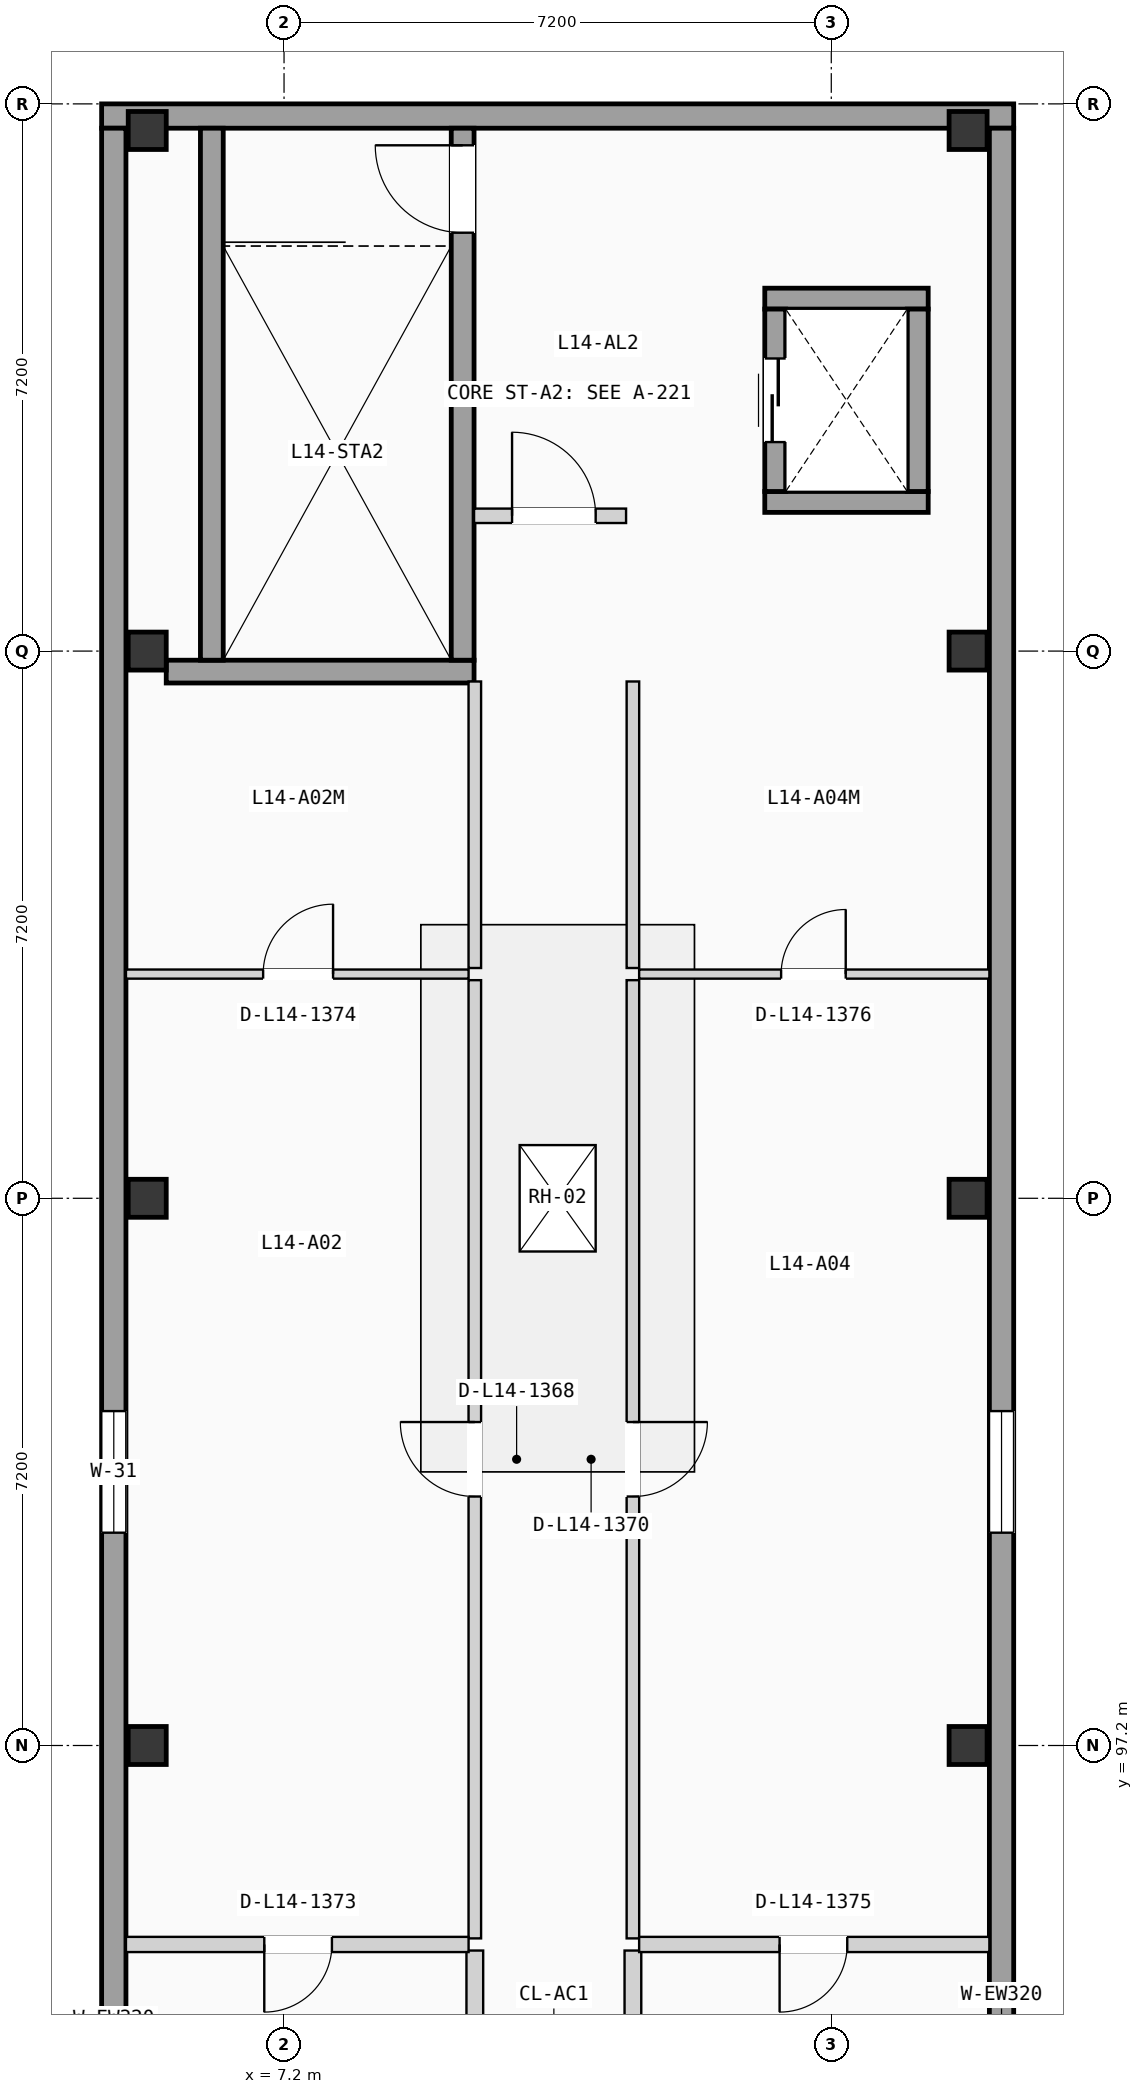
"""IFC4 building model, lengths in metres.
Left out: names, types, materials, properties, quantities, classifications, styles, units other than length and angle.
Written with IfcOpenShell. Run it as: python <this file> out.ifc"""

import sys

from ifc_helpers import new_model, si_unit, direction, frame, frame_2d, origin, origin_2d, place, context, subcontext, project, spatial, rectangle, extrude, element, fill, save


model = new_model("IFC4")
c1 = context("Model", 3, precision=1e-05, world=origin(), true_north=direction((0.0, 1.0)))
c2 = subcontext(c1, "Body", "Model", "MODEL_VIEW")
j1 = project(units=[si_unit("LENGTHUNIT", "METRE"), si_unit("PLANEANGLEUNIT", "RADIAN")], contexts=[c1])
p1 = place(None, origin())
s1 = spatial("IfcSite", under=j1, at=p1, CompositionType="ELEMENT")
p2 = place(p1, origin())
s2 = spatial("IfcBuilding", under=s1, at=p2, CompositionType="ELEMENT")
p3 = place(p2, frame((0.0, 0.0, 46.725)))
s3 = spatial("IfcBuildingStorey", under=s2, at=p3, CompositionType="ELEMENT", Elevation=46.725)
for number, where, z_axis, x_axis in (
    (1, (5.4, 97.2, 0.0), (0.0, 0.0, 1.0), (1.0, 0.0, 0.0)),
    (2, (5.4, 104.4, 0.0), (0.0, 0.0, 1.0), (1.0, 0.0, 0.0)),
    (3, (5.4, 111.6, 0.0), (0.0, 0.0, 1.0), (1.0, 0.0, 0.0)),
    (4, (5.4, 118.45, 0.0), (0.0, 0.0, 1.0), (1.0, 0.0, 0.0)),
    (5, (16.2, 97.2, 0.0), (0.0, 0.0, 1.0), (1.0, 0.0, 0.0)),
    (6, (16.2, 104.4, 0.0), (0.0, 0.0, 1.0), (1.0, 0.0, 0.0)),
    (7, (16.2, 111.6, 0.0), (0.0, 0.0, 1.0), (1.0, 0.0, 0.0)),
    (8, (16.2, 118.45, 0.0), (0.0, 0.0, 1.0), (1.0, 0.0, 0.0)),
):
    element("IfcColumn", number, at=place(p3, frame(where, z_axis=z_axis, x_axis=x_axis)), inside=s3, PredefinedType="COLUMN", context=c2, shape_type="SweptSolid", body=[
        extrude(rectangle(XDim=0.5, YDim=0.5, at=origin_2d()), origin(), (0.0, 0.0, 1.0), 2.85),
    ])
p4 = place(p3, frame((4.8, 118.64, 0.0), z_axis=(0.0, 0.0, 1.0), x_axis=(1.0, 0.0, 0.0)))
e9 = element("IfcWall", 9, at=p4, inside=s3, PredefinedType="SOLIDWALL", context=c2, shape_type="SweptSolid", body=[
    extrude(rectangle(XDim=12.0, YDim=0.32, at=frame_2d((6.0, 0.0))), origin(), (0.0, 0.0, 1.0), 2.55),
])
p5 = place(p3, frame((4.96, 68.72, 0.0), z_axis=(0.0, 0.0, 1.0), x_axis=(0.0, 1.0, 0.0)))
e10 = element("IfcWall", 10, at=p5, inside=s3, PredefinedType="SOLIDWALL", context=c2, shape_type="SweptSolid", body=[
    extrude(rectangle(XDim=49.76, YDim=0.32, at=frame_2d((24.88, 0.0))), origin(), (0.0, 0.0, 1.0), 2.55),
])
p6 = place(p5, frame((16.161, 0.0, 0.515)))
e11 = element("IfcOpeningElement", 11, at=p6, cuts=e10, PredefinedType="OPENING", context=c2, shape_type="SweptSolid", body=[
    extrude(rectangle(XDim=1.48, YDim=1.65, at=frame_2d((0.74, 0.825))), frame((0.0, 0.17, 0.0), z_axis=(0.0, -1.0, 0.0), x_axis=(1.0, 0.0, 0.0)), (0.0, 0.0, 1.0), 0.34),
])
p7 = place(p5, frame((21.991, 0.0, 0.85)))
e12 = element("IfcOpeningElement", 12, at=p7, cuts=e10, PredefinedType="OPENING", context=c2, shape_type="SweptSolid", body=[
    extrude(rectangle(XDim=0.95, YDim=1.2, at=frame_2d((0.475, 0.6))), frame((0.0, 0.17, 0.0), z_axis=(0.0, -1.0, 0.0), x_axis=(1.0, 0.0, 0.0)), (0.0, 0.0, 1.0), 0.34),
])
p8 = place(p5, frame((31.28, 0.0, 0.75)))
e13 = element("IfcOpeningElement", 13, at=p8, cuts=e10, PredefinedType="OPENING", context=c2, shape_type="SweptSolid", body=[
    extrude(rectangle(XDim=1.6, YDim=1.2, at=frame_2d((0.8, 0.6))), frame((0.0, 0.17, 0.0), z_axis=(0.0, -1.0, 0.0), x_axis=(1.0, 0.0, 0.0)), (0.0, 0.0, 1.0), 0.34),
])
p9 = place(p3, frame((16.64, 68.72, 0.0), z_axis=(0.0, 0.0, 1.0), x_axis=(0.0, 1.0, 0.0)))
e14 = element("IfcWall", 14, at=p9, inside=s3, PredefinedType="SOLIDWALL", context=c2, shape_type="SweptSolid", body=[
    extrude(rectangle(XDim=49.76, YDim=0.32, at=frame_2d((24.88, 0.0))), origin(), (0.0, 0.0, 1.0), 2.55),
])
p10 = place(p9, frame((16.88, 0.0, 0.75)))
e15 = element("IfcOpeningElement", 15, at=p10, cuts=e14, PredefinedType="OPENING", context=c2, shape_type="SweptSolid", body=[
    extrude(rectangle(XDim=1.6, YDim=1.35, at=frame_2d((0.8, 0.675))), frame((0.0, 0.17, 0.0), z_axis=(0.0, -1.0, 0.0), x_axis=(1.0, 0.0, 0.0)), (0.0, 0.0, 1.0), 0.34),
])
p11 = place(p9, frame((31.28, 0.0, 0.665)))
e16 = element("IfcOpeningElement", 16, at=p11, cuts=e14, PredefinedType="OPENING", context=c2, shape_type="SweptSolid", body=[
    extrude(rectangle(XDim=1.6, YDim=1.5, at=frame_2d((0.8, 0.75))), frame((0.0, 0.17, 0.0), z_axis=(0.0, -1.0, 0.0), x_axis=(1.0, 0.0, 0.0)), (0.0, 0.0, 1.0), 0.34),
])
p12 = place(p3, frame((5.65, 111.33, 0.0), z_axis=(0.0, 0.0, 1.0), x_axis=(1.0, 0.0, 0.0)))
e17 = element("IfcWall", 17, at=p12, inside=s3, PredefinedType="SHEAR", context=c2, shape_type="SweptSolid", body=[
    extrude(rectangle(XDim=4.05, YDim=0.3, at=frame_2d((2.025, 0.0))), origin(), (0.0, 0.0, 1.0), 2.55),
])
p13 = place(p3, frame((6.25, 111.48, 0.0), z_axis=(0.0, 0.0, 1.0), x_axis=(0.0, 1.0, 0.0)))
e18 = element("IfcWall", 18, at=p13, inside=s3, PredefinedType="SHEAR", context=c2, shape_type="SweptSolid", body=[
    extrude(rectangle(XDim=7.0, YDim=0.3, at=frame_2d((3.5, 0.0))), origin(), (0.0, 0.0, 1.0), 2.55),
])
p14 = place(p3, frame((9.55, 111.48, 0.0), z_axis=(0.0, 0.0, 1.0), x_axis=(0.0, 1.0, 0.0)))
e19 = element("IfcWall", 19, at=p14, inside=s3, PredefinedType="SHEAR", context=c2, shape_type="SweptSolid", body=[
    extrude(rectangle(XDim=7.0, YDim=0.3, at=frame_2d((3.5, 0.0))), origin(), (0.0, 0.0, 1.0), 2.55),
])
p15 = place(p14, frame((5.625, 0.0, 0.0)))
e20 = element("IfcOpeningElement", 20, at=p15, cuts=e19, PredefinedType="OPENING", context=c2, shape_type="SweptSolid", body=[
    extrude(rectangle(XDim=1.15, YDim=2.12, at=frame_2d((0.575, 1.06))), frame((0.0, 0.16, 0.0), z_axis=(0.0, -1.0, 0.0), x_axis=(1.0, 0.0, 0.0)), (0.0, 0.0, 1.0), 0.32),
])
for number, where, z_axis, x_axis in (
    (21, (13.525, 113.562, 0.0), (0.0, 0.0, 1.0), (1.0, 0.0, 0.0)),
    (22, (13.525, 116.238, 0.0), (0.0, 0.0, 1.0), (1.0, 0.0, 0.0)),
):
    element("IfcWall", number, at=place(p3, frame(where, z_axis=z_axis, x_axis=x_axis)), inside=s3, PredefinedType="SHEAR", context=c2, shape_type="SweptSolid", body=[
        extrude(rectangle(XDim=2.15, YDim=0.275, at=frame_2d((1.075, 0.0))), origin(), (0.0, 0.0, 1.0), 2.55),
    ])
p16 = place(p3, frame((13.663, 113.7, 0.0), z_axis=(0.0, 0.0, 1.0), x_axis=(0.0, 1.0, 0.0)))
e23 = element("IfcWall", 23, at=p16, inside=s3, PredefinedType="SHEAR", context=c2, shape_type="SweptSolid", body=[
    extrude(rectangle(XDim=2.4, YDim=0.275, at=frame_2d((1.2, 0.0))), origin(), (0.0, 0.0, 1.0), 2.55),
])
p17 = place(p16, frame((0.65, 0.0, 0.0)))
e24 = element("IfcOpeningElement", 24, at=p17, cuts=e23, PredefinedType="OPENING", context=c2, shape_type="SweptSolid", body=[
    extrude(rectangle(XDim=1.1, YDim=2.15, at=frame_2d((0.55, 1.075))), frame((0.0, 0.147, 0.0), z_axis=(0.0, -1.0, 0.0), x_axis=(1.0, 0.0, 0.0)), (0.0, 0.0, 1.0), 0.295),
])
p18 = place(p3, frame((15.538, 113.7, 0.0), z_axis=(0.0, 0.0, 1.0), x_axis=(0.0, 1.0, 0.0)))
e25 = element("IfcWall", 25, at=p18, inside=s3, PredefinedType="SHEAR", context=c2, shape_type="SweptSolid", body=[
    extrude(rectangle(XDim=2.4, YDim=0.275, at=frame_2d((1.2, 0.0))), origin(), (0.0, 0.0, 1.0), 2.55),
])
p19 = place(p3, frame((9.7, 113.38, 0.0), z_axis=(0.0, 0.0, 1.0), x_axis=(1.0, 0.0, 0.0)))
e26 = element("IfcWall", 26, at=p19, inside=s3, PredefinedType="PARTITIONING", context=c2, shape_type="SweptSolid", body=[
    extrude(rectangle(XDim=2.0, YDim=0.19, at=frame_2d((1.0, 0.0))), origin(), (0.0, 0.0, 1.0), 2.39),
])
p20 = place(p19, frame((0.5, 0.0, 0.0)))
e27 = element("IfcOpeningElement", 27, at=p20, cuts=e26, PredefinedType="OPENING", context=c2, shape_type="SweptSolid", body=[
    extrude(rectangle(XDim=1.1, YDim=2.12, at=frame_2d((0.55, 1.06))), frame((0.0, 0.105, 0.0), z_axis=(0.0, -1.0, 0.0), x_axis=(1.0, 0.0, 0.0)), (0.0, 0.0, 1.0), 0.21),
])
p21 = place(p3, frame((9.71, 92.282, 0.0), z_axis=(0.0, 0.0, 1.0), x_axis=(0.0, 1.0, 0.0)))
e28 = element("IfcWall", 28, at=p21, inside=s3, PredefinedType="PLUMBINGWALL", context=c2, shape_type="SweptSolid", body=[
    extrude(rectangle(XDim=2.22, YDim=0.22, at=frame_2d((1.11, 0.0))), origin(), (0.0, 0.0, 1.0), 2.39),
])
p22 = place(p3, frame((9.71, 94.662, 0.0), z_axis=(0.0, 0.0, 1.0), x_axis=(0.0, 1.0, 0.0)))
e29 = element("IfcWall", 29, at=p22, inside=s3, PredefinedType="PARTITIONING", context=c2, shape_type="SweptSolid", body=[
    extrude(rectangle(XDim=12.608, YDim=0.165, at=frame_2d((6.304, 0.0))), origin(), (0.0, 0.0, 1.0), 2.39),
])
p23 = place(p22, frame((5.814, 0.0, 0.0)))
e30 = element("IfcOpeningElement", 30, at=p23, cuts=e29, PredefinedType="OPENING", context=c2, shape_type="SweptSolid", body=[
    extrude(rectangle(XDim=0.98, YDim=2.08, at=frame_2d((0.49, 1.04))), frame((0.0, 0.093, 0.0), z_axis=(0.0, -1.0, 0.0), x_axis=(1.0, 0.0, 0.0)), (0.0, 0.0, 1.0), 0.185),
])
p24 = place(p3, frame((9.71, 107.43, 0.0), z_axis=(0.0, 0.0, 1.0), x_axis=(0.0, 1.0, 0.0)))
e31 = element("IfcWall", 31, at=p24, inside=s3, PredefinedType="PARTITIONING", context=c2, shape_type="SweptSolid", body=[
    extrude(rectangle(XDim=3.77, YDim=0.165, at=frame_2d((1.885, 0.0))), origin(), (0.0, 0.0, 1.0), 2.39),
])
p25 = place(p3, frame((11.79, 92.282, 0.0), z_axis=(0.0, 0.0, 1.0), x_axis=(0.0, 1.0, 0.0)))
e32 = element("IfcWall", 32, at=p25, inside=s3, PredefinedType="PLUMBINGWALL", context=c2, shape_type="SweptSolid", body=[
    extrude(rectangle(XDim=2.22, YDim=0.22, at=frame_2d((1.11, 0.0))), origin(), (0.0, 0.0, 1.0), 2.39),
])
p26 = place(p3, frame((11.79, 94.662, 0.0), z_axis=(0.0, 0.0, 1.0), x_axis=(0.0, 1.0, 0.0)))
e33 = element("IfcWall", 33, at=p26, inside=s3, PredefinedType="PARTITIONING", context=c2, shape_type="SweptSolid", body=[
    extrude(rectangle(XDim=12.608, YDim=0.165, at=frame_2d((6.304, 0.0))), origin(), (0.0, 0.0, 1.0), 2.39),
])
p27 = place(p26, frame((5.814, 0.0, 0.0)))
e34 = element("IfcOpeningElement", 34, at=p27, cuts=e33, PredefinedType="OPENING", context=c2, shape_type="SweptSolid", body=[
    extrude(rectangle(XDim=0.98, YDim=2.08, at=frame_2d((0.49, 1.04))), frame((0.0, 0.093, 0.0), z_axis=(0.0, -1.0, 0.0), x_axis=(1.0, 0.0, 0.0)), (0.0, 0.0, 1.0), 0.185),
])
p28 = place(p3, frame((11.79, 107.43, 0.0), z_axis=(0.0, 0.0, 1.0), x_axis=(0.0, 1.0, 0.0)))
e35 = element("IfcWall", 35, at=p28, inside=s3, PredefinedType="PARTITIONING", context=c2, shape_type="SweptSolid", body=[
    extrude(rectangle(XDim=3.77, YDim=0.165, at=frame_2d((1.885, 0.0))), origin(), (0.0, 0.0, 1.0), 2.39),
])
p29 = place(p3, frame((5.12, 94.582, 0.0), z_axis=(0.0, 0.0, 1.0), x_axis=(1.0, 0.0, 0.0)))
e36 = element("IfcWall", 36, at=p29, inside=s3, PredefinedType="PLUMBINGWALL", context=c2, shape_type="SweptSolid", body=[
    extrude(rectangle(XDim=4.508, YDim=0.2, at=frame_2d((2.254, 0.0))), origin(), (0.0, 0.0, 1.0), 2.39),
])
p30 = place(p29, frame((1.82, 0.0, 0.0)))
e37 = element("IfcOpeningElement", 37, at=p30, cuts=e36, PredefinedType="OPENING", context=c2, shape_type="SweptSolid", body=[
    extrude(rectangle(XDim=0.89, YDim=2.03, at=frame_2d((0.445, 1.015))), frame((0.0, 0.11, 0.0), z_axis=(0.0, -1.0, 0.0), x_axis=(1.0, 0.0, 0.0)), (0.0, 0.0, 1.0), 0.22),
])
p31 = place(p3, frame((5.12, 107.35, 0.0), z_axis=(0.0, 0.0, 1.0), x_axis=(1.0, 0.0, 0.0)))
e38 = element("IfcWall", 38, at=p31, inside=s3, PredefinedType="PARTITIONING", context=c2, shape_type="SweptSolid", body=[
    extrude(rectangle(XDim=4.508, YDim=0.12, at=frame_2d((2.254, 0.0))), origin(), (0.0, 0.0, 1.0), 2.39),
])
p32 = place(p31, frame((1.805, 0.0, 0.0)))
e39 = element("IfcOpeningElement", 39, at=p32, cuts=e38, PredefinedType="OPENING", context=c2, shape_type="SweptSolid", body=[
    extrude(rectangle(XDim=0.92, YDim=2.02, at=frame_2d((0.46, 1.01))), frame((0.0, 0.07, 0.0), z_axis=(0.0, -1.0, 0.0), x_axis=(1.0, 0.0, 0.0)), (0.0, 0.0, 1.0), 0.14),
])
p33 = place(p3, frame((11.872, 94.582, 0.0), z_axis=(0.0, 0.0, 1.0), x_axis=(1.0, 0.0, 0.0)))
e40 = element("IfcWall", 40, at=p33, inside=s3, PredefinedType="PLUMBINGWALL", context=c2, shape_type="SweptSolid", body=[
    extrude(rectangle(XDim=4.608, YDim=0.2, at=frame_2d((2.304, 0.0))), origin(), (0.0, 0.0, 1.0), 2.39),
])
p34 = place(p33, frame((1.848, 0.0, 0.0)))
e41 = element("IfcOpeningElement", 41, at=p34, cuts=e40, PredefinedType="OPENING", context=c2, shape_type="SweptSolid", body=[
    extrude(rectangle(XDim=0.89, YDim=2.03, at=frame_2d((0.445, 1.015))), frame((0.0, 0.11, 0.0), z_axis=(0.0, -1.0, 0.0), x_axis=(1.0, 0.0, 0.0)), (0.0, 0.0, 1.0), 0.22),
])
p35 = place(p3, frame((11.872, 107.35, 0.0), z_axis=(0.0, 0.0, 1.0), x_axis=(1.0, 0.0, 0.0)))
e42 = element("IfcWall", 42, at=p35, inside=s3, PredefinedType="PARTITIONING", context=c2, shape_type="SweptSolid", body=[
    extrude(rectangle(XDim=4.608, YDim=0.12, at=frame_2d((2.304, 0.0))), origin(), (0.0, 0.0, 1.0), 2.39),
])
p36 = place(p35, frame((1.868, 0.0, 0.0)))
e43 = element("IfcOpeningElement", 43, at=p36, cuts=e42, PredefinedType="OPENING", context=c2, shape_type="SweptSolid", body=[
    extrude(rectangle(XDim=0.85, YDim=2.01, at=frame_2d((0.425, 1.005))), frame((0.0, 0.07, 0.0), z_axis=(0.0, -1.0, 0.0), x_axis=(1.0, 0.0, 0.0)), (0.0, 0.0, 1.0), 0.14),
])
p37 = place(p8, origin())
e44 = element("IfcWindow", 44, at=p37, inside=s3, PartitioningType="DOUBLE_PANEL_VERTICAL", PredefinedType="WINDOW", context=c2, shape_type="SweptSolid", body=[
    extrude(rectangle(XDim=1.6, YDim=1.2, at=frame_2d((0.8, 0.6))), frame((0.0, 0.03, 0.0), z_axis=(0.0, -1.0, 0.0), x_axis=(1.0, 0.0, 0.0)), (0.0, 0.0, 1.0), 0.06),
])
fill(e13, e44)
p38 = place(p11, origin())
e45 = element("IfcWindow", 45, at=p38, inside=s3, PartitioningType="DOUBLE_PANEL_VERTICAL", PredefinedType="WINDOW", context=c2, shape_type="SweptSolid", body=[
    extrude(rectangle(XDim=1.6, YDim=1.5, at=frame_2d((0.8, 0.75))), frame((0.0, 0.03, 0.0), z_axis=(0.0, -1.0, 0.0), x_axis=(1.0, 0.0, 0.0)), (0.0, 0.0, 1.0), 0.06),
])
fill(e16, e45)
p39 = place(p3, frame((0.0, 0.0, 2.85)))
p40 = place(p39, frame((10.8, 104.4, 0.0)))
p41 = place(p40, frame((0.0, 0.0, 0.095)))
e46 = element("IfcDoor", 46, at=p41, inside=s3, OperationType="SINGLE_SWING_LEFT", PredefinedType="TRAPDOOR", context=c2, shape_type="SweptSolid", body=[
    extrude(rectangle(XDim=1.0, YDim=1.4, at=origin_2d()), origin(), (0.0, 0.0, 1.0), 0.05),
])
p42 = place(p15, origin())
e47 = element("IfcDoor", 47, at=p42, inside=s3, OperationType="SINGLE_SWING_RIGHT", PredefinedType="DOOR", context=c2, shape_type="SweptSolid", body=[
    extrude(rectangle(XDim=1.15, YDim=2.12, at=frame_2d((0.575, 1.06))), frame((0.0, 0.025, 0.0), z_axis=(0.0, -1.0, 0.0), x_axis=(1.0, 0.0, 0.0)), (0.0, 0.0, 1.0), 0.05),
])
fill(e20, e47)
p43 = place(p17, origin())
e48 = element("IfcDoor", 48, at=p43, inside=s3, OperationType="SLIDING_TO_LEFT", PredefinedType="DOOR", context=c2, shape_type="SweptSolid", body=[
    extrude(rectangle(XDim=1.1, YDim=2.15, at=frame_2d((0.55, 1.075))), frame((0.0, 0.025, 0.0), z_axis=(0.0, -1.0, 0.0), x_axis=(1.0, 0.0, 0.0)), (0.0, 0.0, 1.0), 0.05),
])
fill(e24, e48)
p44 = place(p20, origin())
e49 = element("IfcDoor", 49, at=p44, inside=s3, OperationType="SINGLE_SWING_LEFT", PredefinedType="DOOR", context=c2, shape_type="SweptSolid", body=[
    extrude(rectangle(XDim=1.1, YDim=2.12, at=frame_2d((0.55, 1.06))), frame((0.0, 0.025, 0.0), z_axis=(0.0, -1.0, 0.0), x_axis=(1.0, 0.0, 0.0)), (0.0, 0.0, 1.0), 0.05),
])
fill(e27, e49)
p45 = place(p23, origin())
e50 = element("IfcDoor", 50, at=p45, inside=s3, OperationType="SINGLE_SWING_RIGHT", PredefinedType="DOOR", context=c2, shape_type="SweptSolid", body=[
    extrude(rectangle(XDim=0.98, YDim=2.08, at=frame_2d((0.49, 1.04))), frame((0.0, 0.025, 0.0), z_axis=(0.0, -1.0, 0.0), x_axis=(1.0, 0.0, 0.0)), (0.0, 0.0, 1.0), 0.05),
])
fill(e30, e50)
p46 = place(p27, frame((0.98, 0.0, 0.0), z_axis=(0.0, 0.0, 1.0), x_axis=(-1.0, 0.0, 0.0)))
e51 = element("IfcDoor", 51, at=p46, inside=s3, OperationType="SINGLE_SWING_RIGHT", PredefinedType="DOOR", context=c2, shape_type="SweptSolid", body=[
    extrude(rectangle(XDim=0.98, YDim=2.08, at=frame_2d((0.49, 1.04))), frame((0.0, 0.025, 0.0), z_axis=(0.0, -1.0, 0.0), x_axis=(1.0, 0.0, 0.0)), (0.0, 0.0, 1.0), 0.05),
])
fill(e34, e51)
p47 = place(p30, frame((0.89, 0.0, 0.0), z_axis=(0.0, 0.0, 1.0), x_axis=(-1.0, 0.0, 0.0)))
e52 = element("IfcDoor", 52, at=p47, inside=s3, OperationType="SINGLE_SWING_LEFT", PredefinedType="DOOR", context=c2, shape_type="SweptSolid", body=[
    extrude(rectangle(XDim=0.89, YDim=2.03, at=frame_2d((0.445, 1.015))), frame((0.0, 0.025, 0.0), z_axis=(0.0, -1.0, 0.0), x_axis=(1.0, 0.0, 0.0)), (0.0, 0.0, 1.0), 0.05),
])
fill(e37, e52)
p48 = place(p32, origin())
e53 = element("IfcDoor", 53, at=p48, inside=s3, OperationType="SINGLE_SWING_RIGHT", PredefinedType="DOOR", context=c2, shape_type="SweptSolid", body=[
    extrude(rectangle(XDim=0.92, YDim=2.02, at=frame_2d((0.46, 1.01))), frame((0.0, 0.025, 0.0), z_axis=(0.0, -1.0, 0.0), x_axis=(1.0, 0.0, 0.0)), (0.0, 0.0, 1.0), 0.05),
])
fill(e39, e53)
p49 = place(p34, frame((0.89, 0.0, 0.0), z_axis=(0.0, 0.0, 1.0), x_axis=(-1.0, 0.0, 0.0)))
e54 = element("IfcDoor", 54, at=p49, inside=s3, OperationType="SINGLE_SWING_LEFT", PredefinedType="DOOR", context=c2, shape_type="SweptSolid", body=[
    extrude(rectangle(XDim=0.89, YDim=2.03, at=frame_2d((0.445, 1.015))), frame((0.0, 0.025, 0.0), z_axis=(0.0, -1.0, 0.0), x_axis=(1.0, 0.0, 0.0)), (0.0, 0.0, 1.0), 0.05),
])
fill(e41, e54)
p50 = place(p36, origin())
e55 = element("IfcDoor", 55, at=p50, inside=s3, OperationType="SINGLE_SWING_RIGHT", PredefinedType="DOOR", context=c2, shape_type="SweptSolid", body=[
    extrude(rectangle(XDim=0.85, YDim=2.01, at=frame_2d((0.425, 1.005))), frame((0.0, 0.025, 0.0), z_axis=(0.0, -1.0, 0.0), x_axis=(1.0, 0.0, 0.0)), (0.0, 0.0, 1.0), 0.05),
])
fill(e43, e55)
save(model, sys.argv[1])
